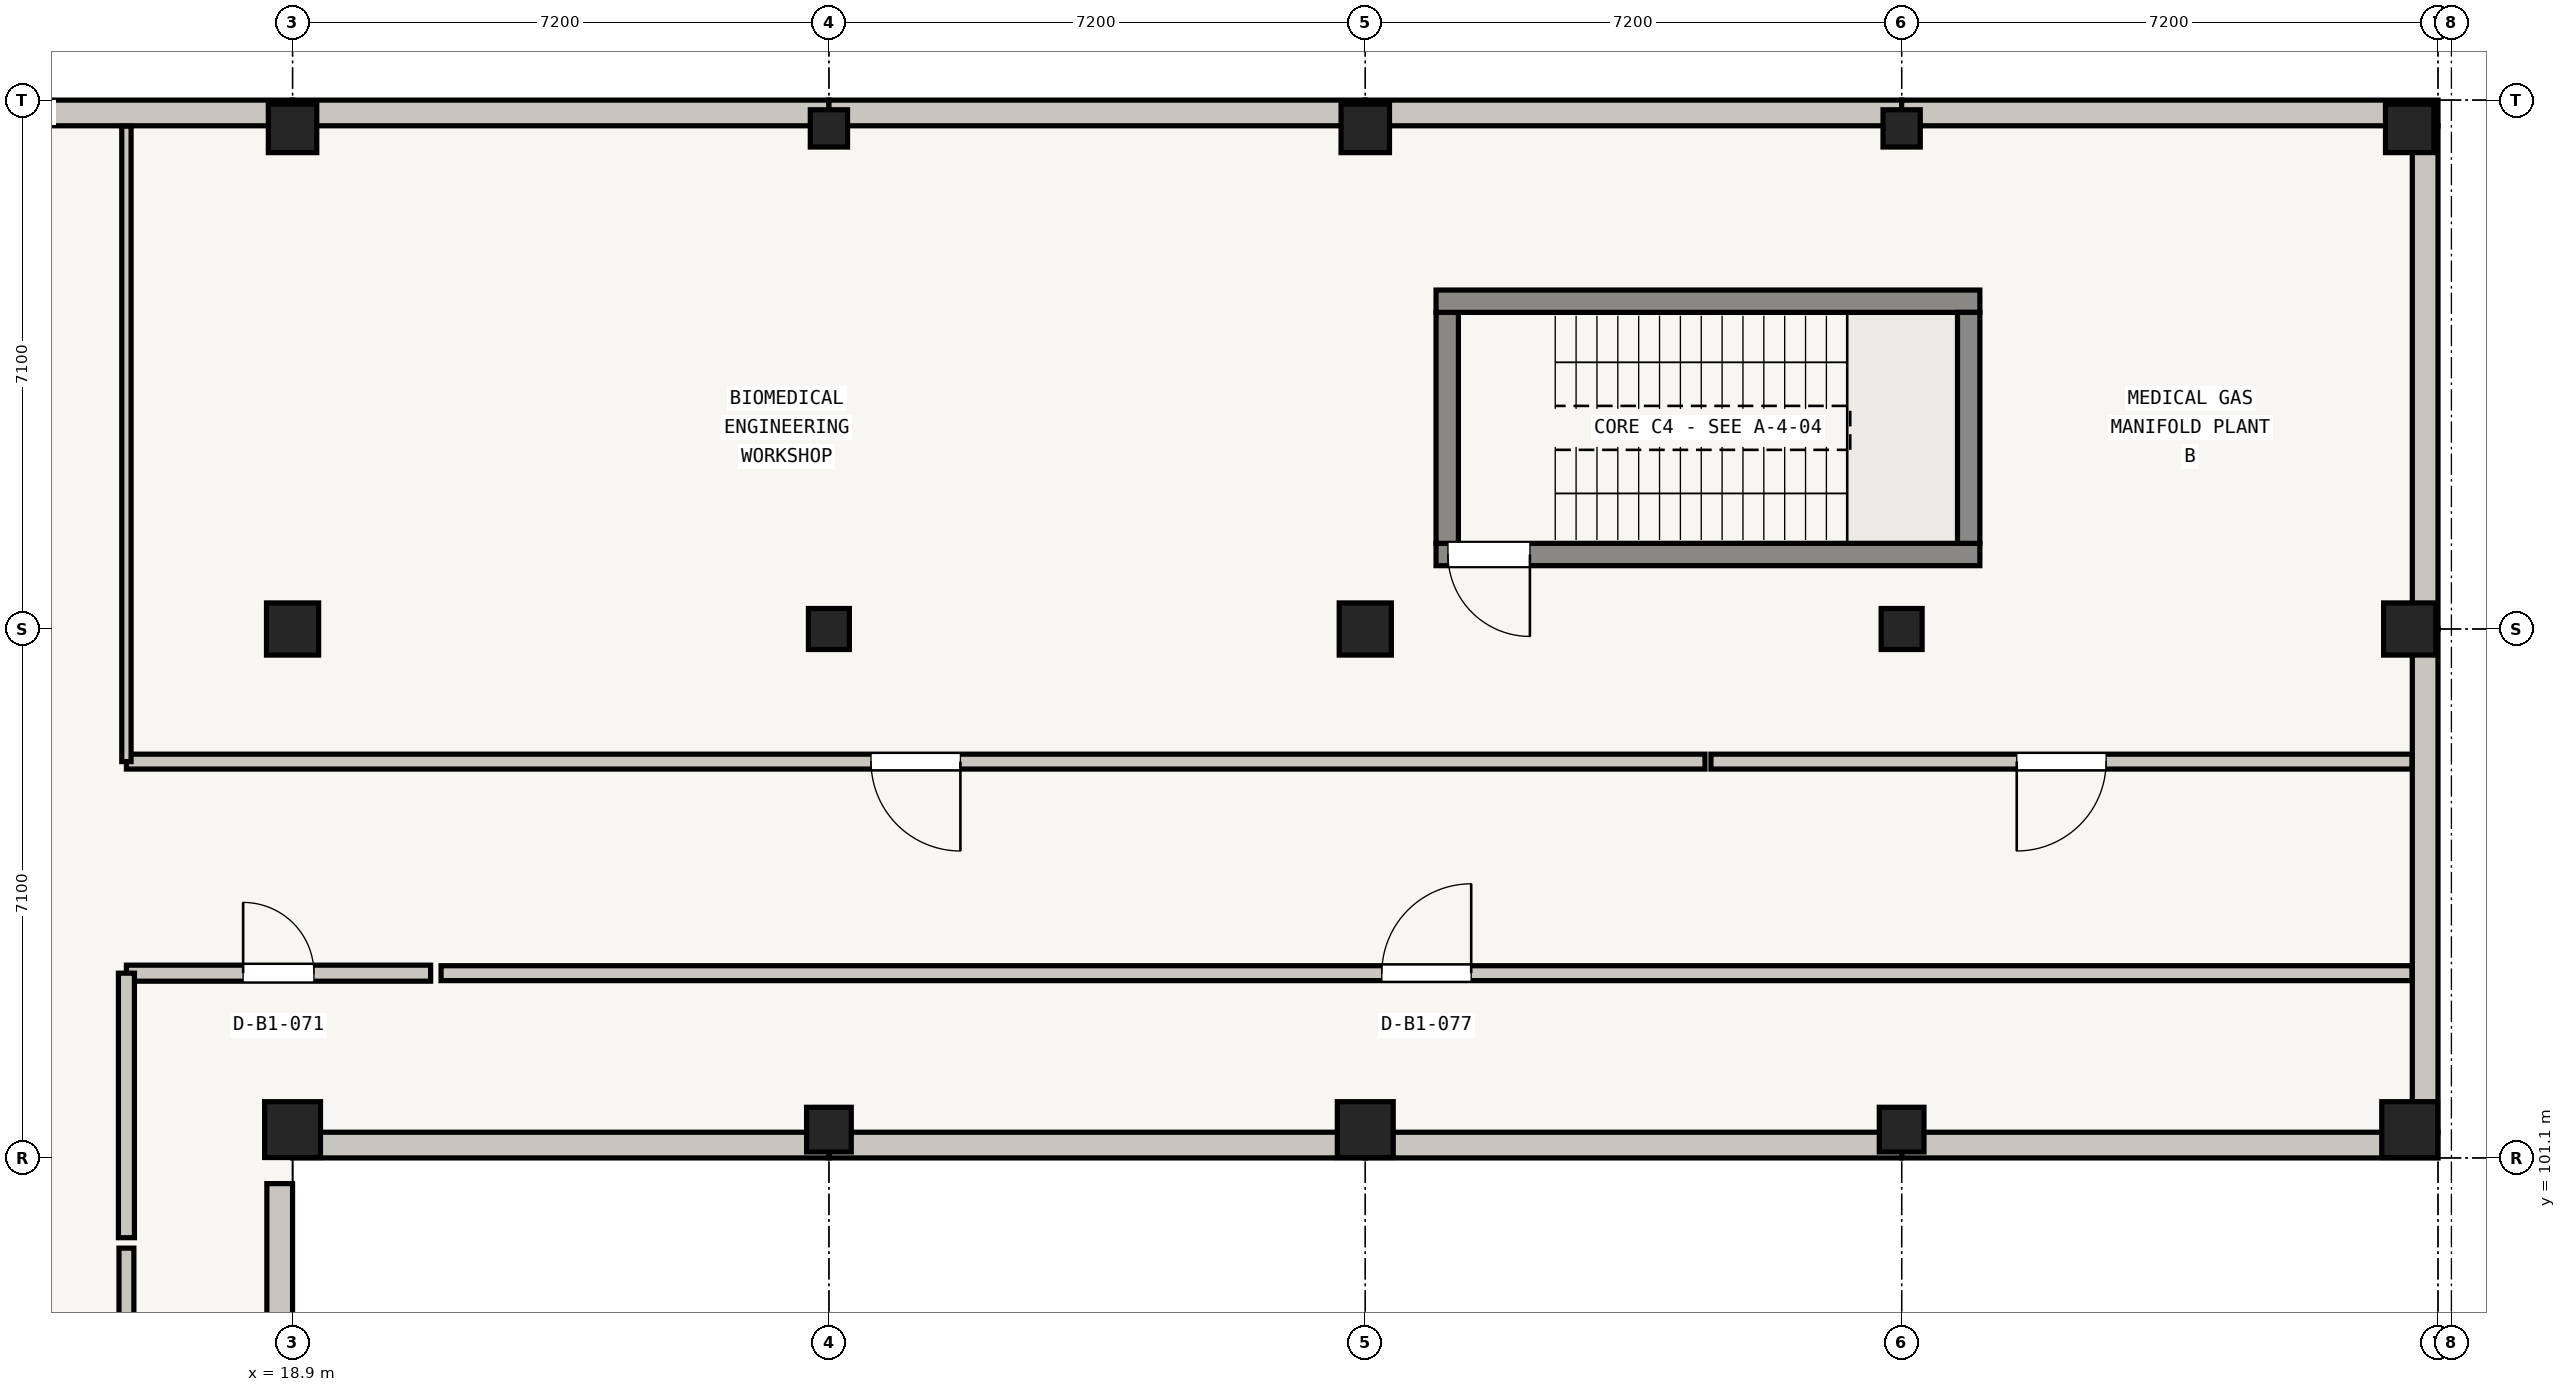
"""IFC4 building model, lengths in metres.
Left out: names, types, materials, properties, quantities, classifications, styles, units other than length and angle.
Written with IfcOpenShell. Run it as: python <this file> out.ifc"""

import sys

from ifc_helpers import new_model, si_unit, direction, frame, frame_2d, origin, origin_2d, place, context, subcontext, project, spatial, rectangle, extrude, element, fill, save


model = new_model("IFC4")
c1 = context("Model", 3, precision=1e-05, world=origin(), true_north=direction((0.0, 1.0)))
c2 = subcontext(c1, "Body", "Model", "MODEL_VIEW")
j1 = project(units=[si_unit("LENGTHUNIT", "METRE"), si_unit("PLANEANGLEUNIT", "RADIAN")], contexts=[c1])
p1 = place(None, origin())
s1 = spatial("IfcSite", under=j1, at=p1, CompositionType="ELEMENT")
p2 = place(p1, origin())
s2 = spatial("IfcBuilding", under=s1, at=p2, CompositionType="ELEMENT")
p3 = place(p2, frame((0.0, 0.0, -4.5)))
s3 = spatial("IfcBuildingStorey", under=s2, at=p3, CompositionType="ELEMENT", Elevation=-4.5)
p4 = place(p3, frame((18.9, 101.48, -0.42), z_axis=(0.0, 0.0, 1.0), x_axis=(1.0, 0.0, 0.0)))
e1 = element("IfcColumn", 1, at=p4, inside=s3, PredefinedType="COLUMN", context=c2, shape_type="SweptSolid", body=[
    extrude(rectangle(XDim=0.75, YDim=0.75, at=origin_2d()), origin(), (0.0, 0.0, 1.0), 4.655),
])
p5 = place(p3, frame((18.9, 108.2, -0.42), z_axis=(0.0, 0.0, 1.0), x_axis=(1.0, 0.0, 0.0)))
e2 = element("IfcColumn", 2, at=p5, inside=s3, PredefinedType="COLUMN", context=c2, shape_type="SweptSolid", body=[
    extrude(rectangle(XDim=0.7, YDim=0.7, at=origin_2d()), origin(), (0.0, 0.0, 1.0), 4.655),
])
p6 = place(p3, frame((18.9, 114.92, -0.42), z_axis=(0.0, 0.0, 1.0), x_axis=(1.0, 0.0, 0.0)))
e3 = element("IfcColumn", 3, at=p6, inside=s3, PredefinedType="COLUMN", context=c2, shape_type="SweptSolid", body=[
    extrude(rectangle(XDim=0.65, YDim=0.65, at=origin_2d()), origin(), (0.0, 0.0, 1.0), 4.655),
])
p7 = place(p3, frame((26.1, 101.48, -0.42), z_axis=(0.0, 0.0, 1.0), x_axis=(1.0, 0.0, 0.0)))
e4 = element("IfcColumn", 4, at=p7, inside=s3, PredefinedType="COLUMN", context=c2, shape_type="SweptSolid", body=[
    extrude(rectangle(XDim=0.6, YDim=0.6, at=origin_2d()), origin(), (0.0, 0.0, 1.0), 4.655),
])
p8 = place(p3, frame((26.1, 108.2, -0.42), z_axis=(0.0, 0.0, 1.0), x_axis=(1.0, 0.0, 0.0)))
e5 = element("IfcColumn", 5, at=p8, inside=s3, PredefinedType="COLUMN", context=c2, shape_type="SweptSolid", body=[
    extrude(rectangle(XDim=0.55, YDim=0.55, at=origin_2d()), origin(), (0.0, 0.0, 1.0), 4.655),
])
p9 = place(p3, frame((26.1, 114.92, -0.42), z_axis=(0.0, 0.0, 1.0), x_axis=(1.0, 0.0, 0.0)))
e6 = element("IfcColumn", 6, at=p9, inside=s3, PredefinedType="COLUMN", context=c2, shape_type="SweptSolid", body=[
    extrude(rectangle(XDim=0.5, YDim=0.5, at=origin_2d()), origin(), (0.0, 0.0, 1.0), 4.655),
])
p10 = place(p3, frame((33.3, 101.48, -0.42), z_axis=(0.0, 0.0, 1.0), x_axis=(1.0, 0.0, 0.0)))
e7 = element("IfcColumn", 7, at=p10, inside=s3, PredefinedType="COLUMN", context=c2, shape_type="SweptSolid", body=[
    extrude(rectangle(XDim=0.75, YDim=0.75, at=origin_2d()), origin(), (0.0, 0.0, 1.0), 4.655),
])
p11 = place(p3, frame((33.3, 108.2, -0.42), z_axis=(0.0, 0.0, 1.0), x_axis=(1.0, 0.0, 0.0)))
e8 = element("IfcColumn", 8, at=p11, inside=s3, PredefinedType="COLUMN", context=c2, shape_type="SweptSolid", body=[
    extrude(rectangle(XDim=0.7, YDim=0.7, at=origin_2d()), origin(), (0.0, 0.0, 1.0), 4.655),
])
p12 = place(p3, frame((33.3, 114.92, -0.42), z_axis=(0.0, 0.0, 1.0), x_axis=(1.0, 0.0, 0.0)))
e9 = element("IfcColumn", 9, at=p12, inside=s3, PredefinedType="COLUMN", context=c2, shape_type="SweptSolid", body=[
    extrude(rectangle(XDim=0.65, YDim=0.65, at=origin_2d()), origin(), (0.0, 0.0, 1.0), 4.655),
])
p13 = place(p3, frame((40.5, 101.48, -0.42), z_axis=(0.0, 0.0, 1.0), x_axis=(1.0, 0.0, 0.0)))
e10 = element("IfcColumn", 10, at=p13, inside=s3, PredefinedType="COLUMN", context=c2, shape_type="SweptSolid", body=[
    extrude(rectangle(XDim=0.6, YDim=0.6, at=origin_2d()), origin(), (0.0, 0.0, 1.0), 4.655),
])
p14 = place(p3, frame((40.5, 108.2, -0.42), z_axis=(0.0, 0.0, 1.0), x_axis=(1.0, 0.0, 0.0)))
e11 = element("IfcColumn", 11, at=p14, inside=s3, PredefinedType="COLUMN", context=c2, shape_type="SweptSolid", body=[
    extrude(rectangle(XDim=0.55, YDim=0.55, at=origin_2d()), origin(), (0.0, 0.0, 1.0), 4.655),
])
p15 = place(p3, frame((40.5, 114.92, -0.42), z_axis=(0.0, 0.0, 1.0), x_axis=(1.0, 0.0, 0.0)))
e12 = element("IfcColumn", 12, at=p15, inside=s3, PredefinedType="COLUMN", context=c2, shape_type="SweptSolid", body=[
    extrude(rectangle(XDim=0.5, YDim=0.5, at=origin_2d()), origin(), (0.0, 0.0, 1.0), 4.655),
])
p16 = place(p3, frame((47.32, 101.48, -0.42), z_axis=(0.0, 0.0, 1.0), x_axis=(1.0, 0.0, 0.0)))
e13 = element("IfcColumn", 13, at=p16, inside=s3, PredefinedType="COLUMN", context=c2, shape_type="SweptSolid", body=[
    extrude(rectangle(XDim=0.75, YDim=0.75, at=origin_2d()), origin(), (0.0, 0.0, 1.0), 4.655),
])
p17 = place(p3, frame((47.32, 108.2, -0.42), z_axis=(0.0, 0.0, 1.0), x_axis=(1.0, 0.0, 0.0)))
e14 = element("IfcColumn", 14, at=p17, inside=s3, PredefinedType="COLUMN", context=c2, shape_type="SweptSolid", body=[
    extrude(rectangle(XDim=0.7, YDim=0.7, at=origin_2d()), origin(), (0.0, 0.0, 1.0), 4.655),
])
p18 = place(p3, frame((47.32, 114.92, -0.42), z_axis=(0.0, 0.0, 1.0), x_axis=(1.0, 0.0, 0.0)))
e15 = element("IfcColumn", 15, at=p18, inside=s3, PredefinedType="COLUMN", context=c2, shape_type="SweptSolid", body=[
    extrude(rectangle(XDim=0.65, YDim=0.65, at=origin_2d()), origin(), (0.0, 0.0, 1.0), 4.655),
])
p19 = place(p3, frame((11.7, 115.127, -0.42), z_axis=(0.0, 0.0, 1.0), x_axis=(1.0, 0.0, 0.0)))
e16 = element("IfcWall", 16, at=p19, inside=s3, PredefinedType="SOLIDWALL", context=c2, shape_type="SweptSolid", body=[
    extrude(rectangle(XDim=7.2, YDim=0.345, at=frame_2d((3.6, 0.0))), origin(), (0.0, 0.0, 1.0), 4.06),
])
p20 = place(p3, frame((18.9, 115.127, -0.42), z_axis=(0.0, 0.0, 1.0), x_axis=(1.0, 0.0, 0.0)))
e17 = element("IfcWall", 17, at=p20, inside=s3, PredefinedType="SOLIDWALL", context=c2, shape_type="SweptSolid", body=[
    extrude(rectangle(XDim=7.2, YDim=0.345, at=frame_2d((3.6, 0.0))), origin(), (0.0, 0.0, 1.0), 3.84),
])
p21 = place(p3, frame((26.1, 115.127, -0.42), z_axis=(0.0, 0.0, 1.0), x_axis=(1.0, 0.0, 0.0)))
e18 = element("IfcWall", 18, at=p21, inside=s3, PredefinedType="SOLIDWALL", context=c2, shape_type="SweptSolid", body=[
    extrude(rectangle(XDim=7.2, YDim=0.345, at=frame_2d((3.6, 0.0))), origin(), (0.0, 0.0, 1.0), 3.84),
])
p22 = place(p3, frame((33.3, 115.127, -0.42), z_axis=(0.0, 0.0, 1.0), x_axis=(1.0, 0.0, 0.0)))
e19 = element("IfcWall", 19, at=p22, inside=s3, PredefinedType="SOLIDWALL", context=c2, shape_type="SweptSolid", body=[
    extrude(rectangle(XDim=7.2, YDim=0.345, at=frame_2d((3.6, 0.0))), origin(), (0.0, 0.0, 1.0), 4.02),
])
p23 = place(p3, frame((40.5, 115.127, -0.42), z_axis=(0.0, 0.0, 1.0), x_axis=(1.0, 0.0, 0.0)))
e20 = element("IfcWall", 20, at=p23, inside=s3, PredefinedType="SOLIDWALL", context=c2, shape_type="SweptSolid", body=[
    extrude(rectangle(XDim=7.2, YDim=0.345, at=frame_2d((3.6, 0.0))), origin(), (0.0, 0.0, 1.0), 4.04),
])
p24 = place(p3, frame((47.528, 114.955, -0.42), z_axis=(0.0, 0.0, 1.0), x_axis=(0.0, -1.0, 0.0)))
e21 = element("IfcWall", 21, at=p24, inside=s3, PredefinedType="SOLIDWALL", context=c2, shape_type="SweptSolid", body=[
    extrude(rectangle(XDim=6.755, YDim=0.345, at=frame_2d((3.377, 0.0))), origin(), (0.0, 0.0, 1.0), 4.04),
])
p25 = place(p3, frame((47.528, 108.2, -0.42), z_axis=(0.0, 0.0, 1.0), x_axis=(0.0, -1.0, 0.0)))
e22 = element("IfcWall", 22, at=p25, inside=s3, PredefinedType="SOLIDWALL", context=c2, shape_type="SweptSolid", body=[
    extrude(rectangle(XDim=6.755, YDim=0.345, at=frame_2d((3.377, 0.0))), origin(), (0.0, 0.0, 1.0), 4.04),
])
for number, where, z_axis, x_axis in (
    (23, (47.7, 101.272, -0.42), (0.0, 0.0, 1.0), (-1.0, 0.0, 0.0)),
    (24, (40.5, 101.272, -0.42), (0.0, 0.0, 1.0), (-1.0, 0.0, 0.0)),
    (25, (33.3, 101.272, -0.42), (0.0, 0.0, 1.0), (-1.0, 0.0, 0.0)),
):
    element("IfcWall", number, at=place(p3, frame(where, z_axis=z_axis, x_axis=x_axis)), inside=s3, PredefinedType="SOLIDWALL", context=c2, shape_type="SweptSolid", body=[
        extrude(rectangle(XDim=7.2, YDim=0.345, at=frame_2d((3.6, 0.0))), origin(), (0.0, 0.0, 1.0), 3.69),
    ])
p26 = place(p3, frame((26.1, 101.272, -0.42), z_axis=(0.0, 0.0, 1.0), x_axis=(-1.0, 0.0, 0.0)))
e26 = element("IfcWall", 26, at=p26, inside=s3, PredefinedType="SOLIDWALL", context=c2, shape_type="SweptSolid", body=[
    extrude(rectangle(XDim=7.2, YDim=0.345, at=frame_2d((3.6, 0.0))), origin(), (0.0, 0.0, 1.0), 3.99),
])
p27 = place(p3, frame((18.728, 100.755, -0.42), z_axis=(0.0, 0.0, 1.0), x_axis=(0.0, -1.0, 0.0)))
e27 = element("IfcWall", 27, at=p27, inside=s3, PredefinedType="SOLIDWALL", context=c2, shape_type="SweptSolid", body=[
    extrude(rectangle(XDim=6.855, YDim=0.345, at=frame_2d((3.427, 0.0))), origin(), (0.0, 0.0, 1.0), 4.16),
])
p28 = place(p3, frame((41.55, 109.2, 0.0), z_axis=(0.0, 0.0, 1.0), x_axis=(-1.0, 0.0, 0.0)))
e28 = element("IfcWall", 28, at=p28, inside=s3, PredefinedType="SHEAR", context=c2, shape_type="SweptSolid", body=[
    extrude(rectangle(XDim=7.3, YDim=0.3, at=frame_2d((3.65, 0.0))), origin(), (0.0, 0.0, 1.0), 4.235),
])
p29 = place(p28, frame((6.04, 0.0, 0.0)))
e29 = element("IfcOpeningElement", 29, at=p29, cuts=e28, PredefinedType="OPENING", context=c2, shape_type="SweptSolid", body=[
    extrude(rectangle(XDim=1.1, YDim=2.05, at=frame_2d((0.55, 1.025))), frame((0.0, 0.15, 0.0), z_axis=(0.0, -1.0, 0.0), x_axis=(1.0, 0.0, 0.0)), (0.0, 0.0, 1.0), 0.3),
])
p30 = place(p3, frame((34.4, 109.35, 0.0), z_axis=(0.0, 0.0, 1.0), x_axis=(0.0, 1.0, 0.0)))
e30 = element("IfcWall", 30, at=p30, inside=s3, PredefinedType="SHEAR", context=c2, shape_type="SweptSolid", body=[
    extrude(rectangle(XDim=3.1, YDim=0.3, at=frame_2d((1.55, 0.0))), origin(), (0.0, 0.0, 1.0), 4.235),
])
p31 = place(p3, frame((34.25, 112.6, 0.0), z_axis=(0.0, 0.0, 1.0), x_axis=(1.0, 0.0, 0.0)))
e31 = element("IfcWall", 31, at=p31, inside=s3, PredefinedType="SHEAR", context=c2, shape_type="SweptSolid", body=[
    extrude(rectangle(XDim=7.3, YDim=0.3, at=frame_2d((3.65, 0.0))), origin(), (0.0, 0.0, 1.0), 4.235),
])
p32 = place(p3, frame((41.4, 112.45, 0.0), z_axis=(0.0, 0.0, 1.0), x_axis=(0.0, -1.0, 0.0)))
e32 = element("IfcWall", 32, at=p32, inside=s3, PredefinedType="SHEAR", context=c2, shape_type="SweptSolid", body=[
    extrude(rectangle(XDim=3.1, YDim=0.3, at=frame_2d((1.55, 0.0))), origin(), (0.0, 0.0, 1.0), 4.235),
])
p33 = place(p3, frame((16.67, 103.58, 0.0), z_axis=(0.0, 0.0, 1.0), x_axis=(1.0, 0.0, 0.0)))
e33 = element("IfcWall", 33, at=p33, inside=s3, PredefinedType="PLUMBINGWALL", context=c2, shape_type="SweptSolid", body=[
    extrude(rectangle(XDim=4.083, YDim=0.215, at=frame_2d((2.042, 0.0))), origin(), (0.0, 0.0, 1.0), 3.255),
])
p34 = place(p33, frame((1.567, 0.0, 0.0)))
e34 = element("IfcOpeningElement", 34, at=p34, cuts=e33, PredefinedType="OPENING", context=c2, shape_type="SweptSolid", body=[
    extrude(rectangle(XDim=0.95, YDim=2.05, at=frame_2d((0.475, 1.025))), frame((0.0, 0.107, 0.0), z_axis=(0.0, -1.0, 0.0), x_axis=(1.0, 0.0, 0.0)), (0.0, 0.0, 1.0), 0.215),
])
p35 = place(p3, frame((16.67, 100.029, 0.0), z_axis=(0.0, 0.0, 1.0), x_axis=(0.0, 1.0, 0.0)))
e35 = element("IfcWall", 35, at=p35, inside=s3, PredefinedType="PLUMBINGWALL", context=c2, shape_type="SweptSolid", body=[
    extrude(rectangle(XDim=3.551, YDim=0.215, at=frame_2d((1.775, 0.0))), origin(), (0.0, 0.0, 1.0), 3.255),
])
p36 = place(p3, frame((37.86, 106.42, 0.0), z_axis=(0.0, 0.0, 1.0), x_axis=(-1.0, 0.0, 0.0)))
e36 = element("IfcWall", 36, at=p36, inside=s3, PredefinedType="SOLIDWALL", context=c2, shape_type="SweptSolid", body=[
    extrude(rectangle(XDim=21.19, YDim=0.2, at=frame_2d((10.595, 0.0))), origin(), (0.0, 0.0, 1.0), 3.255),
])
p37 = place(p36, frame((9.995, 0.0, 0.0)))
e37 = element("IfcOpeningElement", 37, at=p37, cuts=e36, PredefinedType="OPENING", context=c2, shape_type="SweptSolid", body=[
    extrude(rectangle(XDim=1.2, YDim=2.05, at=frame_2d((0.6, 1.025))), frame((0.0, 0.1, 0.0), z_axis=(0.0, -1.0, 0.0), x_axis=(1.0, 0.0, 0.0)), (0.0, 0.0, 1.0), 0.2),
])
p38 = place(p3, frame((16.67, 106.42, 0.0), z_axis=(0.0, 0.0, 1.0), x_axis=(0.0, 1.0, 0.0)))
e38 = element("IfcWall", 38, at=p38, inside=s3, PredefinedType="PARTITIONING", context=c2, shape_type="SweptSolid", body=[
    extrude(rectangle(XDim=8.53, YDim=0.125, at=frame_2d((4.265, 0.0))), origin(), (0.0, 0.0, 1.0), 3.255),
])
p39 = place(p3, frame((47.35, 106.42, 0.0), z_axis=(0.0, 0.0, 1.0), x_axis=(-1.0, 0.0, 0.0)))
e39 = element("IfcWall", 39, at=p39, inside=s3, PredefinedType="SOLIDWALL", context=c2, shape_type="SweptSolid", body=[
    extrude(rectangle(XDim=9.41, YDim=0.2, at=frame_2d((4.705, 0.0))), origin(), (0.0, 0.0, 1.0), 3.255),
])
p40 = place(p39, frame((4.105, 0.0, 0.0)))
e40 = element("IfcOpeningElement", 40, at=p40, cuts=e39, PredefinedType="OPENING", context=c2, shape_type="SweptSolid", body=[
    extrude(rectangle(XDim=1.2, YDim=2.05, at=frame_2d((0.6, 1.025))), frame((0.0, 0.1, 0.0), z_axis=(0.0, -1.0, 0.0), x_axis=(1.0, 0.0, 0.0)), (0.0, 0.0, 1.0), 0.2),
])
p41 = place(p3, frame((20.894, 103.58, 0.0), z_axis=(0.0, 0.0, 1.0), x_axis=(1.0, 0.0, 0.0)))
e41 = element("IfcWall", 41, at=p41, inside=s3, PredefinedType="SOLIDWALL", context=c2, shape_type="SweptSolid", body=[
    extrude(rectangle(XDim=26.457, YDim=0.2, at=frame_2d((13.228, 0.0))), origin(), (0.0, 0.0, 1.0), 3.255),
])
p42 = place(p41, frame((12.628, 0.0, 0.0)))
e42 = element("IfcOpeningElement", 42, at=p42, cuts=e41, PredefinedType="OPENING", context=c2, shape_type="SweptSolid", body=[
    extrude(rectangle(XDim=1.2, YDim=2.05, at=frame_2d((0.6, 1.025))), frame((0.0, 0.1, 0.0), z_axis=(0.0, -1.0, 0.0), x_axis=(1.0, 0.0, 0.0)), (0.0, 0.0, 1.0), 0.2),
])
p43 = place(p3, frame((16.67, 77.03, 0.0), z_axis=(0.0, 0.0, 1.0), x_axis=(0.0, 1.0, 0.0)))
e43 = element("IfcWall", 43, at=p43, inside=s3, PredefinedType="SOLIDWALL", context=c2, shape_type="SweptSolid", body=[
    extrude(rectangle(XDim=22.859, YDim=0.2, at=frame_2d((11.43, 0.0))), origin(), (0.0, 0.0, 1.0), 3.255),
])
p44 = place(p43, frame((10.83, 0.0, 0.0)))
e44 = element("IfcOpeningElement", 44, at=p44, cuts=e43, PredefinedType="OPENING", context=c2, shape_type="SweptSolid", body=[
    extrude(rectangle(XDim=1.2, YDim=2.05, at=frame_2d((0.6, 1.025))), frame((0.0, 0.1, 0.0), z_axis=(0.0, -1.0, 0.0), x_axis=(1.0, 0.0, 0.0)), (0.0, 0.0, 1.0), 0.2),
])
p45 = place(p29, origin())
e45 = element("IfcDoor", 45, at=p45, inside=s3, OperationType="SINGLE_SWING_LEFT", PredefinedType="DOOR", context=c2, shape_type="SweptSolid", body=[
    extrude(rectangle(XDim=1.1, YDim=2.05, at=frame_2d((0.55, 1.025))), frame((0.0, 0.025, 0.0), z_axis=(0.0, -1.0, 0.0), x_axis=(1.0, 0.0, 0.0)), (0.0, 0.0, 1.0), 0.05),
])
fill(e29, e45)
p46 = place(p34, origin())
e46 = element("IfcDoor", 46, at=p46, inside=s3, OperationType="SINGLE_SWING_LEFT", PredefinedType="DOOR", context=c2, shape_type="SweptSolid", body=[
    extrude(rectangle(XDim=0.95, YDim=2.05, at=frame_2d((0.475, 1.025))), frame((0.0, 0.025, 0.0), z_axis=(0.0, -1.0, 0.0), x_axis=(1.0, 0.0, 0.0)), (0.0, 0.0, 1.0), 0.05),
])
fill(e34, e46)
p47 = place(p37, origin())
e47 = element("IfcDoor", 47, at=p47, inside=s3, OperationType="SINGLE_SWING_LEFT", PredefinedType="DOOR", context=c2, shape_type="SweptSolid", body=[
    extrude(rectangle(XDim=1.2, YDim=2.05, at=frame_2d((0.6, 1.025))), frame((0.0, 0.025, 0.0), z_axis=(0.0, -1.0, 0.0), x_axis=(1.0, 0.0, 0.0)), (0.0, 0.0, 1.0), 0.05),
])
fill(e37, e47)
p48 = place(p40, origin())
e48 = element("IfcDoor", 48, at=p48, inside=s3, OperationType="SINGLE_SWING_RIGHT", PredefinedType="DOOR", context=c2, shape_type="SweptSolid", body=[
    extrude(rectangle(XDim=1.2, YDim=2.05, at=frame_2d((0.6, 1.025))), frame((0.0, 0.025, 0.0), z_axis=(0.0, -1.0, 0.0), x_axis=(1.0, 0.0, 0.0)), (0.0, 0.0, 1.0), 0.05),
])
fill(e40, e48)
p49 = place(p42, origin())
e49 = element("IfcDoor", 49, at=p49, inside=s3, OperationType="SINGLE_SWING_RIGHT", PredefinedType="DOOR", context=c2, shape_type="SweptSolid", body=[
    extrude(rectangle(XDim=1.2, YDim=2.05, at=frame_2d((0.6, 1.025))), frame((0.0, 0.025, 0.0), z_axis=(0.0, -1.0, 0.0), x_axis=(1.0, 0.0, 0.0)), (0.0, 0.0, 1.0), 0.05),
])
fill(e42, e49)
save(model, sys.argv[1])
